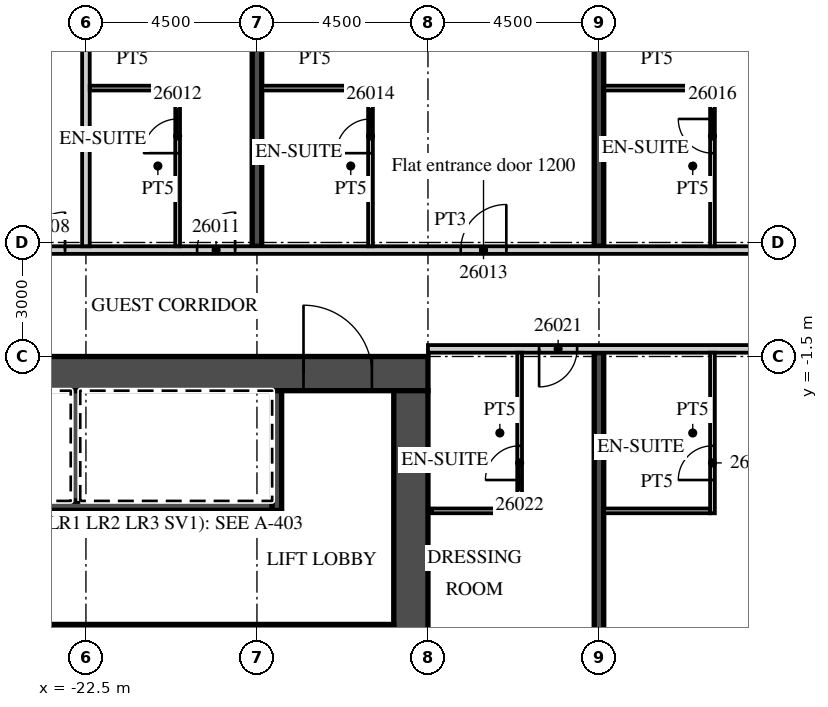
"""IFC4 building model, lengths in metres.
Left out: names, types, materials, properties, quantities, classifications, styles, units other than length and angle.
Written with IfcOpenShell. Run it as: python <this file> out.ifc"""

import sys

from ifc_helpers import new_model, si_unit, direction, frame, frame_2d, origin, place, context, subcontext, project, spatial, rectangle, extrude, element, fill, save


model = new_model("IFC4")
c1 = context("Model", 3, precision=1e-05, world=origin(), true_north=direction((0.0, 1.0)))
c2 = subcontext(c1, "Body", "Model", "MODEL_VIEW")
j1 = project(units=[si_unit("LENGTHUNIT", "METRE"), si_unit("PLANEANGLEUNIT", "RADIAN")], contexts=[c1])
p1 = place(None, origin())
s1 = spatial("IfcSite", under=j1, at=p1, CompositionType="ELEMENT")
p2 = place(p1, origin())
s2 = spatial("IfcBuilding", under=s1, at=p2, CompositionType="ELEMENT")
p3 = place(p2, frame((0.0, 0.0, 120.7)))
s3 = spatial("IfcBuildingStorey", under=s2, at=p3, CompositionType="ELEMENT", Elevation=120.7)
p4 = place(p3, frame((-18.0, 1.4, 0.0), z_axis=(0.0, 0.0, 1.0), x_axis=(0.0, 1.0, 0.0)))
e1 = element("IfcWall", 1, at=p4, inside=s3, PredefinedType="SHEAR", context=c2, shape_type="SweptSolid", body=[
    extrude(rectangle(XDim=18.207, YDim=0.25, at=frame_2d((9.104, 0.0))), origin(), (0.0, 0.0, 1.0), 3.3),
])
p5 = place(p3, frame((-9.0, -21.777, 0.0), z_axis=(0.0, 0.0, 1.0), x_axis=(0.0, 1.0, 0.0)))
e2 = element("IfcWall", 2, at=p5, inside=s3, PredefinedType="SHEAR", context=c2, shape_type="SweptSolid", body=[
    extrude(rectangle(XDim=20.377, YDim=0.25, at=frame_2d((10.188, 0.0))), origin(), (0.0, 0.0, 1.0), 3.3),
])
p6 = place(p3, frame((-9.0, 1.4, 0.0), z_axis=(0.0, 0.0, 1.0), x_axis=(0.0, 1.0, 0.0)))
e3 = element("IfcWall", 3, at=p6, inside=s3, PredefinedType="SHEAR", context=c2, shape_type="SweptSolid", body=[
    extrude(rectangle(XDim=19.073, YDim=0.25, at=frame_2d((9.537, 0.0))), origin(), (0.0, 0.0, 1.0), 3.3),
])
p7 = place(p3, frame((-39.316, 1.3, 0.0), z_axis=(0.0, 0.0, 1.0), x_axis=(1.0, 0.0, 0.0)))
e4 = element("IfcWall", 4, at=p7, inside=s3, PredefinedType="PARTITIONING", context=c2, shape_type="SweptSolid", body=[
    extrude(rectangle(XDim=52.816, YDim=0.2, at=frame_2d((26.408, 0.0))), origin(), (0.0, 0.0, 1.0), 3.02),
])
p8 = place(p7, frame((0.15, 0.0, 0.0)))
e5 = element("IfcOpeningElement", 5, at=p8, cuts=e4, PredefinedType="OPENING", context=c2, shape_type="SweptSolid", body=[
    extrude(rectangle(XDim=0.9, YDim=2.1, at=frame_2d((0.45, 1.05))), frame((0.0, 0.11, 0.0), z_axis=(0.0, -1.0, 0.0), x_axis=(1.0, 0.0, 0.0)), (0.0, 0.0, 1.0), 0.22),
])
p9 = place(p7, frame((3.891, 0.0, 0.0)))
e6 = element("IfcOpeningElement", 6, at=p9, cuts=e4, PredefinedType="OPENING", context=c2, shape_type="SweptSolid", body=[
    extrude(rectangle(XDim=1.0, YDim=2.1, at=frame_2d((0.5, 1.05))), frame((0.0, 0.11, 0.0), z_axis=(0.0, -1.0, 0.0), x_axis=(1.0, 0.0, 0.0)), (0.0, 0.0, 1.0), 0.22),
])
p10 = place(p7, frame((10.741, 0.0, 0.0)))
e7 = element("IfcOpeningElement", 7, at=p10, cuts=e4, PredefinedType="OPENING", context=c2, shape_type="SweptSolid", body=[
    extrude(rectangle(XDim=1.0, YDim=2.1, at=frame_2d((0.5, 1.05))), frame((0.0, 0.11, 0.0), z_axis=(0.0, -1.0, 0.0), x_axis=(1.0, 0.0, 0.0)), (0.0, 0.0, 1.0), 0.22),
])
p11 = place(p7, frame((15.266, 0.0, 0.0)))
e8 = element("IfcOpeningElement", 8, at=p11, cuts=e4, PredefinedType="OPENING", context=c2, shape_type="SweptSolid", body=[
    extrude(rectangle(XDim=1.0, YDim=2.1, at=frame_2d((0.5, 1.05))), frame((0.0, 0.11, 0.0), z_axis=(0.0, -1.0, 0.0), x_axis=(1.0, 0.0, 0.0)), (0.0, 0.0, 1.0), 0.22),
])
p12 = place(p7, frame((19.741, 0.0, 0.0)))
e9 = element("IfcOpeningElement", 9, at=p12, cuts=e4, PredefinedType="OPENING", context=c2, shape_type="SweptSolid", body=[
    extrude(rectangle(XDim=1.0, YDim=2.1, at=frame_2d((0.5, 1.05))), frame((0.0, 0.11, 0.0), z_axis=(0.0, -1.0, 0.0), x_axis=(1.0, 0.0, 0.0)), (0.0, 0.0, 1.0), 0.22),
])
p13 = place(p7, frame((26.678, 0.0, 0.0)))
e10 = element("IfcOpeningElement", 10, at=p13, cuts=e4, PredefinedType="OPENING", context=c2, shape_type="SweptSolid", body=[
    extrude(rectangle(XDim=1.2, YDim=2.1, at=frame_2d((0.6, 1.05))), frame((0.0, 0.11, 0.0), z_axis=(0.0, -1.0, 0.0), x_axis=(1.0, 0.0, 0.0)), (0.0, 0.0, 1.0), 0.22),
])
p14 = place(p7, frame((35.678, 0.0, 0.0)))
e11 = element("IfcOpeningElement", 11, at=p14, cuts=e4, PredefinedType="OPENING", context=c2, shape_type="SweptSolid", body=[
    extrude(rectangle(XDim=1.2, YDim=2.1, at=frame_2d((0.6, 1.05))), frame((0.0, 0.11, 0.0), z_axis=(0.0, -1.0, 0.0), x_axis=(1.0, 0.0, 0.0)), (0.0, 0.0, 1.0), 0.22),
])
p15 = place(p7, frame((41.754, 0.0, 0.0)))
e12 = element("IfcOpeningElement", 12, at=p15, cuts=e4, PredefinedType="OPENING", context=c2, shape_type="SweptSolid", body=[
    extrude(rectangle(XDim=1.2, YDim=2.1, at=frame_2d((0.6, 1.05))), frame((0.0, 0.11, 0.0), z_axis=(0.0, -1.0, 0.0), x_axis=(1.0, 0.0, 0.0)), (0.0, 0.0, 1.0), 0.22),
])
p16 = place(p7, frame((51.241, 0.0, 0.0)))
e13 = element("IfcOpeningElement", 13, at=p16, cuts=e4, PredefinedType="OPENING", context=c2, shape_type="SweptSolid", body=[
    extrude(rectangle(XDim=1.0, YDim=2.1, at=frame_2d((0.5, 1.05))), frame((0.0, 0.11, 0.0), z_axis=(0.0, -1.0, 0.0), x_axis=(1.0, 0.0, 0.0)), (0.0, 0.0, 1.0), 0.22),
])
p17 = place(p3, frame((-22.5, 1.4, 0.0), z_axis=(0.0, 0.0, 1.0), x_axis=(0.0, 1.0, 0.0)))
e14 = element("IfcWall", 14, at=p17, inside=s3, PredefinedType="PARTITIONING", context=c2, shape_type="SweptSolid", body=[
    extrude(rectangle(XDim=17.796, YDim=0.2, at=frame_2d((8.898, 0.0))), origin(), (0.0, 0.0, 1.0), 3.02),
])
p18 = place(p3, frame((-20.087, 1.4, 0.0), z_axis=(0.0, 0.0, 1.0), x_axis=(0.0, 1.0, 0.0)))
e15 = element("IfcWall", 15, at=p18, inside=s3, PredefinedType="PARTITIONING", context=c2, shape_type="SweptSolid", body=[
    extrude(rectangle(XDim=4.225, YDim=0.125, at=frame_2d((2.113, 0.0))), origin(), (0.0, 0.0, 1.0), 3.02),
])
p19 = place(p18, frame((2.45, 0.0, 0.0)))
e16 = element("IfcOpeningElement", 16, at=p19, cuts=e15, PredefinedType="OPENING", context=c2, shape_type="SweptSolid", body=[
    extrude(rectangle(XDim=0.9, YDim=2.1, at=frame_2d((0.45, 1.05))), frame((0.0, 0.073, 0.0), z_axis=(0.0, -1.0, 0.0), x_axis=(1.0, 0.0, 0.0)), (0.0, 0.0, 1.0), 0.145),
])
p20 = place(p3, frame((-22.4, 5.562, 0.0), z_axis=(0.0, 0.0, 1.0), x_axis=(1.0, 0.0, 0.0)))
e17 = element("IfcWall", 17, at=p20, inside=s3, PredefinedType="PARTITIONING", context=c2, shape_type="SweptSolid", body=[
    extrude(rectangle(XDim=2.25, YDim=0.125, at=frame_2d((1.125, 0.0))), origin(), (0.0, 0.0, 1.0), 3.02),
])
p21 = place(p3, frame((-15.012, 1.4, 0.0), z_axis=(0.0, 0.0, 1.0), x_axis=(0.0, 1.0, 0.0)))
e18 = element("IfcWall", 18, at=p21, inside=s3, PredefinedType="PARTITIONING", context=c2, shape_type="SweptSolid", body=[
    extrude(rectangle(XDim=4.225, YDim=0.125, at=frame_2d((2.113, 0.0))), origin(), (0.0, 0.0, 1.0), 3.02),
])
p22 = place(p21, frame((2.45, 0.0, 0.0)))
e19 = element("IfcOpeningElement", 19, at=p22, cuts=e18, PredefinedType="OPENING", context=c2, shape_type="SweptSolid", body=[
    extrude(rectangle(XDim=0.9, YDim=2.1, at=frame_2d((0.45, 1.05))), frame((0.0, 0.073, 0.0), z_axis=(0.0, -1.0, 0.0), x_axis=(1.0, 0.0, 0.0)), (0.0, 0.0, 1.0), 0.145),
])
p23 = place(p3, frame((-17.875, 5.562, 0.0), z_axis=(0.0, 0.0, 1.0), x_axis=(1.0, 0.0, 0.0)))
e20 = element("IfcWall", 20, at=p23, inside=s3, PredefinedType="PARTITIONING", context=c2, shape_type="SweptSolid", body=[
    extrude(rectangle(XDim=2.8, YDim=0.125, at=frame_2d((1.4, 0.0))), origin(), (0.0, 0.0, 1.0), 3.02),
])
p24 = place(p3, frame((-6.013, 1.4, 0.0), z_axis=(0.0, 0.0, 1.0), x_axis=(0.0, 1.0, 0.0)))
e21 = element("IfcWall", 21, at=p24, inside=s3, PredefinedType="PARTITIONING", context=c2, shape_type="SweptSolid", body=[
    extrude(rectangle(XDim=4.225, YDim=0.125, at=frame_2d((2.113, 0.0))), origin(), (0.0, 0.0, 1.0), 3.02),
])
p25 = place(p24, frame((2.45, 0.0, 0.0)))
e22 = element("IfcOpeningElement", 22, at=p25, cuts=e21, PredefinedType="OPENING", context=c2, shape_type="SweptSolid", body=[
    extrude(rectangle(XDim=0.9, YDim=2.1, at=frame_2d((0.45, 1.05))), frame((0.0, 0.073, 0.0), z_axis=(0.0, -1.0, 0.0), x_axis=(1.0, 0.0, 0.0)), (0.0, 0.0, 1.0), 0.145),
])
p26 = place(p3, frame((-8.875, 5.562, 0.0), z_axis=(0.0, 0.0, 1.0), x_axis=(1.0, 0.0, 0.0)))
e23 = element("IfcWall", 23, at=p26, inside=s3, PredefinedType="PARTITIONING", context=c2, shape_type="SweptSolid", body=[
    extrude(rectangle(XDim=2.8, YDim=0.125, at=frame_2d((1.4, 0.0))), origin(), (0.0, 0.0, 1.0), 3.02),
])
p27 = place(p3, frame((-13.5, -1.3, 0.0), z_axis=(0.0, 0.0, 1.0), x_axis=(1.0, 0.0, 0.0)))
e24 = element("IfcWall", 24, at=p27, inside=s3, PredefinedType="PARTITIONING", context=c2, shape_type="SweptSolid", body=[
    extrude(rectangle(XDim=60.932, YDim=0.2, at=frame_2d((30.466, 0.0))), origin(), (0.0, 0.0, 1.0), 3.02),
])
p28 = place(p27, frame((2.925, 0.0, 0.0)))
e25 = element("IfcOpeningElement", 25, at=p28, cuts=e24, PredefinedType="OPENING", context=c2, shape_type="SweptSolid", body=[
    extrude(rectangle(XDim=1.0, YDim=2.1, at=frame_2d((0.5, 1.05))), frame((0.0, 0.11, 0.0), z_axis=(0.0, -1.0, 0.0), x_axis=(1.0, 0.0, 0.0)), (0.0, 0.0, 1.0), 0.22),
])
p29 = place(p27, frame((9.863, 0.0, 0.0)))
e26 = element("IfcOpeningElement", 26, at=p29, cuts=e24, PredefinedType="OPENING", context=c2, shape_type="SweptSolid", body=[
    extrude(rectangle(XDim=1.2, YDim=2.1, at=frame_2d((0.6, 1.05))), frame((0.0, 0.11, 0.0), z_axis=(0.0, -1.0, 0.0), x_axis=(1.0, 0.0, 0.0)), (0.0, 0.0, 1.0), 0.22),
])
p30 = place(p27, frame((15.938, 0.0, 0.0)))
e27 = element("IfcOpeningElement", 27, at=p30, cuts=e24, PredefinedType="OPENING", context=c2, shape_type="SweptSolid", body=[
    extrude(rectangle(XDim=1.2, YDim=2.1, at=frame_2d((0.6, 1.05))), frame((0.0, 0.11, 0.0), z_axis=(0.0, -1.0, 0.0), x_axis=(1.0, 0.0, 0.0)), (0.0, 0.0, 1.0), 0.22),
])
p31 = place(p27, frame((27.862, 0.0, 0.0)))
e28 = element("IfcOpeningElement", 28, at=p31, cuts=e24, PredefinedType="OPENING", context=c2, shape_type="SweptSolid", body=[
    extrude(rectangle(XDim=1.2, YDim=2.1, at=frame_2d((0.6, 1.05))), frame((0.0, 0.11, 0.0), z_axis=(0.0, -1.0, 0.0), x_axis=(1.0, 0.0, 0.0)), (0.0, 0.0, 1.0), 0.22),
])
p32 = place(p27, frame((34.45, 0.0, 0.0)))
e29 = element("IfcOpeningElement", 29, at=p32, cuts=e24, PredefinedType="OPENING", context=c2, shape_type="SweptSolid", body=[
    extrude(rectangle(XDim=1.0, YDim=2.1, at=frame_2d((0.5, 1.05))), frame((0.0, 0.11, 0.0), z_axis=(0.0, -1.0, 0.0), x_axis=(1.0, 0.0, 0.0)), (0.0, 0.0, 1.0), 0.22),
])
p33 = place(p27, frame((36.55, 0.0, 0.0)))
e30 = element("IfcOpeningElement", 30, at=p33, cuts=e24, PredefinedType="OPENING", context=c2, shape_type="SweptSolid", body=[
    extrude(rectangle(XDim=1.0, YDim=2.1, at=frame_2d((0.5, 1.05))), frame((0.0, 0.11, 0.0), z_axis=(0.0, -1.0, 0.0), x_axis=(1.0, 0.0, 0.0)), (0.0, 0.0, 1.0), 0.22),
])
p34 = place(p27, frame((41.075, 0.0, 0.0)))
e31 = element("IfcOpeningElement", 31, at=p34, cuts=e24, PredefinedType="OPENING", context=c2, shape_type="SweptSolid", body=[
    extrude(rectangle(XDim=1.0, YDim=2.1, at=frame_2d((0.5, 1.05))), frame((0.0, 0.11, 0.0), z_axis=(0.0, -1.0, 0.0), x_axis=(1.0, 0.0, 0.0)), (0.0, 0.0, 1.0), 0.22),
])
p35 = place(p27, frame((45.55, 0.0, 0.0)))
e32 = element("IfcOpeningElement", 32, at=p35, cuts=e24, PredefinedType="OPENING", context=c2, shape_type="SweptSolid", body=[
    extrude(rectangle(XDim=1.0, YDim=2.1, at=frame_2d((0.5, 1.05))), frame((0.0, 0.11, 0.0), z_axis=(0.0, -1.0, 0.0), x_axis=(1.0, 0.0, 0.0)), (0.0, 0.0, 1.0), 0.22),
])
p36 = place(p27, frame((50.075, 0.0, 0.0)))
e33 = element("IfcOpeningElement", 33, at=p36, cuts=e24, PredefinedType="OPENING", context=c2, shape_type="SweptSolid", body=[
    extrude(rectangle(XDim=1.0, YDim=2.1, at=frame_2d((0.5, 1.05))), frame((0.0, 0.11, 0.0), z_axis=(0.0, -1.0, 0.0), x_axis=(1.0, 0.0, 0.0)), (0.0, 0.0, 1.0), 0.22),
])
p37 = place(p27, frame((54.575, 0.0, 0.0)))
e34 = element("IfcOpeningElement", 34, at=p37, cuts=e24, PredefinedType="OPENING", context=c2, shape_type="SweptSolid", body=[
    extrude(rectangle(XDim=1.0, YDim=2.1, at=frame_2d((0.5, 1.05))), frame((0.0, 0.11, 0.0), z_axis=(0.0, -1.0, 0.0), x_axis=(1.0, 0.0, 0.0)), (0.0, 0.0, 1.0), 0.22),
])
p38 = place(p27, frame((59.882, 0.0, 0.0)))
e35 = element("IfcOpeningElement", 35, at=p38, cuts=e24, PredefinedType="OPENING", context=c2, shape_type="SweptSolid", body=[
    extrude(rectangle(XDim=0.9, YDim=2.1, at=frame_2d((0.45, 1.05))), frame((0.0, 0.11, 0.0), z_axis=(0.0, -1.0, 0.0), x_axis=(1.0, 0.0, 0.0)), (0.0, 0.0, 1.0), 0.22),
])
p39 = place(p3, frame((-11.088, -5.625, 0.0), z_axis=(0.0, 0.0, 1.0), x_axis=(0.0, 1.0, 0.0)))
e36 = element("IfcWall", 36, at=p39, inside=s3, PredefinedType="PARTITIONING", context=c2, shape_type="SweptSolid", body=[
    extrude(rectangle(XDim=4.225, YDim=0.125, at=frame_2d((2.113, 0.0))), origin(), (0.0, 0.0, 1.0), 3.02),
])
p40 = place(p39, frame((0.875, 0.0, 0.0)))
e37 = element("IfcOpeningElement", 37, at=p40, cuts=e36, PredefinedType="OPENING", context=c2, shape_type="SweptSolid", body=[
    extrude(rectangle(XDim=0.9, YDim=2.1, at=frame_2d((0.45, 1.05))), frame((0.0, 0.073, 0.0), z_axis=(0.0, -1.0, 0.0), x_axis=(1.0, 0.0, 0.0)), (0.0, 0.0, 1.0), 0.145),
])
p41 = place(p3, frame((-13.4, -5.562, 0.0), z_axis=(0.0, 0.0, 1.0), x_axis=(1.0, 0.0, 0.0)))
e38 = element("IfcWall", 38, at=p41, inside=s3, PredefinedType="PARTITIONING", context=c2, shape_type="SweptSolid", body=[
    extrude(rectangle(XDim=2.25, YDim=0.125, at=frame_2d((1.125, 0.0))), origin(), (0.0, 0.0, 1.0), 3.02),
])
p42 = place(p3, frame((-6.013, -5.625, 0.0), z_axis=(0.0, 0.0, 1.0), x_axis=(0.0, 1.0, 0.0)))
e39 = element("IfcWall", 39, at=p42, inside=s3, PredefinedType="PARTITIONING", context=c2, shape_type="SweptSolid", body=[
    extrude(rectangle(XDim=4.225, YDim=0.125, at=frame_2d((2.113, 0.0))), origin(), (0.0, 0.0, 1.0), 3.02),
])
p43 = place(p42, frame((0.875, 0.0, 0.0)))
e40 = element("IfcOpeningElement", 40, at=p43, cuts=e39, PredefinedType="OPENING", context=c2, shape_type="SweptSolid", body=[
    extrude(rectangle(XDim=0.9, YDim=2.1, at=frame_2d((0.45, 1.05))), frame((0.0, 0.073, 0.0), z_axis=(0.0, -1.0, 0.0), x_axis=(1.0, 0.0, 0.0)), (0.0, 0.0, 1.0), 0.145),
])
p44 = place(p3, frame((-8.875, -5.562, 0.0), z_axis=(0.0, 0.0, 1.0), x_axis=(1.0, 0.0, 0.0)))
e41 = element("IfcWall", 41, at=p44, inside=s3, PredefinedType="PARTITIONING", context=c2, shape_type="SweptSolid", body=[
    extrude(rectangle(XDim=2.8, YDim=0.125, at=frame_2d((1.4, 0.0))), origin(), (0.0, 0.0, 1.0), 3.02),
])
p45 = place(p3, frame((-31.5, -1.95, 0.0), z_axis=(0.0, 0.0, 1.0), x_axis=(1.0, 0.0, 0.0)))
e42 = element("IfcWall", 42, at=p45, inside=s3, PredefinedType="SHEAR", context=c2, shape_type="SweptSolid", body=[
    extrude(rectangle(XDim=18.0, YDim=0.9, at=frame_2d((9.0, 0.0))), origin(), (0.0, 0.0, 1.0), 3.02),
])
p46 = place(p45, frame((14.725, 0.0, 0.0)))
e43 = element("IfcOpeningElement", 43, at=p46, cuts=e42, PredefinedType="OPENING", context=c2, shape_type="SweptSolid", body=[
    extrude(rectangle(XDim=1.8, YDim=2.1, at=frame_2d((0.9, 1.05))), frame((0.0, 0.46, 0.0), z_axis=(0.0, -1.0, 0.0), x_axis=(1.0, 0.0, 0.0)), (0.0, 0.0, 1.0), 0.92),
])
p47 = place(p3, frame((-13.95, -14.6, 0.0), z_axis=(0.0, 0.0, 1.0), x_axis=(0.0, 1.0, 0.0)))
e44 = element("IfcWall", 44, at=p47, inside=s3, PredefinedType="SHEAR", context=c2, shape_type="SweptSolid", body=[
    extrude(rectangle(XDim=12.2, YDim=0.9, at=frame_2d((6.1, 0.0))), origin(), (0.0, 0.0, 1.0), 3.02),
])
p48 = place(p3, frame((-30.6, -5.425, 0.0), z_axis=(0.0, 0.0, 1.0), x_axis=(1.0, 0.0, 0.0)))
e45 = element("IfcWall", 45, at=p48, inside=s3, PredefinedType="SHEAR", context=c2, shape_type="SweptSolid", body=[
    extrude(rectangle(XDim=13.0, YDim=0.25, at=frame_2d((6.5, 0.0))), origin(), (0.0, 0.0, 1.0), 3.02),
])
p49 = place(p3, frame((-17.475, -5.55, 0.0), z_axis=(0.0, 0.0, 1.0), x_axis=(0.0, 1.0, 0.0)))
e46 = element("IfcWall", 46, at=p49, inside=s3, PredefinedType="SHEAR", context=c2, shape_type="SweptSolid", body=[
    extrude(rectangle(XDim=3.15, YDim=0.25, at=frame_2d((1.575, 0.0))), origin(), (0.0, 0.0, 1.0), 3.02),
])
p50 = place(p3, frame((-22.775, -5.3, 0.0), z_axis=(0.0, 0.0, 1.0), x_axis=(0.0, 1.0, 0.0)))
e47 = element("IfcWall", 47, at=p50, inside=s3, PredefinedType="SHEAR", context=c2, shape_type="SweptSolid", body=[
    extrude(rectangle(XDim=2.9, YDim=0.25, at=frame_2d((1.45, 0.0))), origin(), (0.0, 0.0, 1.0), 3.02),
])
p51 = place(p3, frame((-30.6, -8.675, 0.0), z_axis=(0.0, 0.0, 1.0), x_axis=(1.0, 0.0, 0.0)))
e48 = element("IfcWall", 48, at=p51, inside=s3, PredefinedType="SHEAR", context=c2, shape_type="SweptSolid", body=[
    extrude(rectangle(XDim=16.2, YDim=0.25, at=frame_2d((8.1, 0.0))), origin(), (0.0, 0.0, 1.0), 3.02),
])
p52 = place(p51, frame((0.6, 0.0, 0.0)))
e49 = element("IfcOpeningElement", 49, at=p52, cuts=e48, PredefinedType="OPENING", context=c2, shape_type="SweptSolid", body=[
    extrude(rectangle(XDim=1.2, YDim=2.1, at=frame_2d((0.6, 1.05))), frame((0.0, 0.135, 0.0), z_axis=(0.0, -1.0, 0.0), x_axis=(1.0, 0.0, 0.0)), (0.0, 0.0, 1.0), 0.27),
])
p53 = place(p51, frame((3.25, 0.0, 0.0)))
e50 = element("IfcOpeningElement", 50, at=p53, cuts=e48, PredefinedType="OPENING", context=c2, shape_type="SweptSolid", body=[
    extrude(rectangle(XDim=1.2, YDim=2.1, at=frame_2d((0.6, 1.05))), frame((0.0, 0.135, 0.0), z_axis=(0.0, -1.0, 0.0), x_axis=(1.0, 0.0, 0.0)), (0.0, 0.0, 1.0), 0.27),
])
p54 = place(p51, frame((5.9, 0.0, 0.0)))
e51 = element("IfcOpeningElement", 51, at=p54, cuts=e48, PredefinedType="OPENING", context=c2, shape_type="SweptSolid", body=[
    extrude(rectangle(XDim=1.2, YDim=2.1, at=frame_2d((0.6, 1.05))), frame((0.0, 0.135, 0.0), z_axis=(0.0, -1.0, 0.0), x_axis=(1.0, 0.0, 0.0)), (0.0, 0.0, 1.0), 0.27),
])
p55 = place(p51, frame((14.25, 0.0, 0.0)))
e52 = element("IfcOpeningElement", 52, at=p55, cuts=e48, PredefinedType="OPENING", context=c2, shape_type="SweptSolid", body=[
    extrude(rectangle(XDim=1.3, YDim=2.1, at=frame_2d((0.65, 1.05))), frame((0.0, 0.135, 0.0), z_axis=(0.0, -1.0, 0.0), x_axis=(1.0, 0.0, 0.0)), (0.0, 0.0, 1.0), 0.27),
])
p56 = place(p11, origin())
e53 = element("IfcDoor", 53, at=p56, inside=s3, OperationType="SINGLE_SWING_RIGHT", PredefinedType="DOOR", context=c2, shape_type="SweptSolid", body=[
    extrude(rectangle(XDim=1.0, YDim=2.1, at=frame_2d((0.5, 1.05))), frame((0.0, 0.025, 0.0), z_axis=(0.0, -1.0, 0.0), x_axis=(1.0, 0.0, 0.0)), (0.0, 0.0, 1.0), 0.05),
])
fill(e8, e53)
p57 = place(p12, origin())
e54 = element("IfcDoor", 54, at=p57, inside=s3, OperationType="SINGLE_SWING_RIGHT", PredefinedType="DOOR", context=c2, shape_type="SweptSolid", body=[
    extrude(rectangle(XDim=1.0, YDim=2.1, at=frame_2d((0.5, 1.05))), frame((0.0, 0.025, 0.0), z_axis=(0.0, -1.0, 0.0), x_axis=(1.0, 0.0, 0.0)), (0.0, 0.0, 1.0), 0.05),
])
fill(e9, e54)
p58 = place(p19, origin())
e55 = element("IfcDoor", 55, at=p58, inside=s3, OperationType="SINGLE_SWING_LEFT", PredefinedType="DOOR", context=c2, shape_type="SweptSolid", body=[
    extrude(rectangle(XDim=0.9, YDim=2.1, at=frame_2d((0.45, 1.05))), frame((0.0, 0.025, 0.0), z_axis=(0.0, -1.0, 0.0), x_axis=(1.0, 0.0, 0.0)), (0.0, 0.0, 1.0), 0.05),
])
fill(e16, e55)
p59 = place(p13, origin())
e56 = element("IfcDoor", 56, at=p59, inside=s3, OperationType="SINGLE_SWING_RIGHT", PredefinedType="DOOR", context=c2, shape_type="SweptSolid", body=[
    extrude(rectangle(XDim=1.2, YDim=2.1, at=frame_2d((0.6, 1.05))), frame((0.0, 0.025, 0.0), z_axis=(0.0, -1.0, 0.0), x_axis=(1.0, 0.0, 0.0)), (0.0, 0.0, 1.0), 0.05),
])
fill(e10, e56)
p60 = place(p22, origin())
e57 = element("IfcDoor", 57, at=p60, inside=s3, OperationType="SINGLE_SWING_LEFT", PredefinedType="DOOR", context=c2, shape_type="SweptSolid", body=[
    extrude(rectangle(XDim=0.9, YDim=2.1, at=frame_2d((0.45, 1.05))), frame((0.0, 0.025, 0.0), z_axis=(0.0, -1.0, 0.0), x_axis=(1.0, 0.0, 0.0)), (0.0, 0.0, 1.0), 0.05),
])
fill(e19, e57)
p61 = place(p25, origin())
e58 = element("IfcDoor", 58, at=p61, inside=s3, OperationType="SINGLE_SWING_RIGHT", PredefinedType="DOOR", context=c2, shape_type="SweptSolid", body=[
    extrude(rectangle(XDim=0.9, YDim=2.1, at=frame_2d((0.45, 1.05))), frame((0.0, 0.025, 0.0), z_axis=(0.0, -1.0, 0.0), x_axis=(1.0, 0.0, 0.0)), (0.0, 0.0, 1.0), 0.05),
])
fill(e22, e58)
p62 = place(p28, origin())
e59 = element("IfcDoor", 59, at=p62, inside=s3, OperationType="SINGLE_SWING_LEFT", PredefinedType="DOOR", context=c2, shape_type="SweptSolid", body=[
    extrude(rectangle(XDim=1.0, YDim=2.1, at=frame_2d((0.5, 1.05))), frame((0.0, 0.025, 0.0), z_axis=(0.0, -1.0, 0.0), x_axis=(1.0, 0.0, 0.0)), (0.0, 0.0, 1.0), 0.05),
])
fill(e25, e59)
p63 = place(p40, origin())
e60 = element("IfcDoor", 60, at=p63, inside=s3, OperationType="SINGLE_SWING_LEFT", PredefinedType="DOOR", context=c2, shape_type="SweptSolid", body=[
    extrude(rectangle(XDim=0.9, YDim=2.1, at=frame_2d((0.45, 1.05))), frame((0.0, 0.025, 0.0), z_axis=(0.0, -1.0, 0.0), x_axis=(1.0, 0.0, 0.0)), (0.0, 0.0, 1.0), 0.05),
])
fill(e37, e60)
p64 = place(p43, origin())
e61 = element("IfcDoor", 61, at=p64, inside=s3, OperationType="SINGLE_SWING_LEFT", PredefinedType="DOOR", context=c2, shape_type="SweptSolid", body=[
    extrude(rectangle(XDim=0.9, YDim=2.1, at=frame_2d((0.45, 1.05))), frame((0.0, 0.025, 0.0), z_axis=(0.0, -1.0, 0.0), x_axis=(1.0, 0.0, 0.0)), (0.0, 0.0, 1.0), 0.05),
])
fill(e40, e61)
p65 = place(p46, origin())
e62 = element("IfcDoor", 62, at=p65, inside=s3, OperationType="DOUBLE_DOOR_DOUBLE_SWING", PredefinedType="DOOR", context=c2, shape_type="SweptSolid", body=[
    extrude(rectangle(XDim=1.8, YDim=2.1, at=frame_2d((0.9, 1.05))), frame((0.0, 0.025, 0.0), z_axis=(0.0, -1.0, 0.0), x_axis=(1.0, 0.0, 0.0)), (0.0, 0.0, 1.0), 0.05),
])
fill(e43, e62)
save(model, sys.argv[1])
